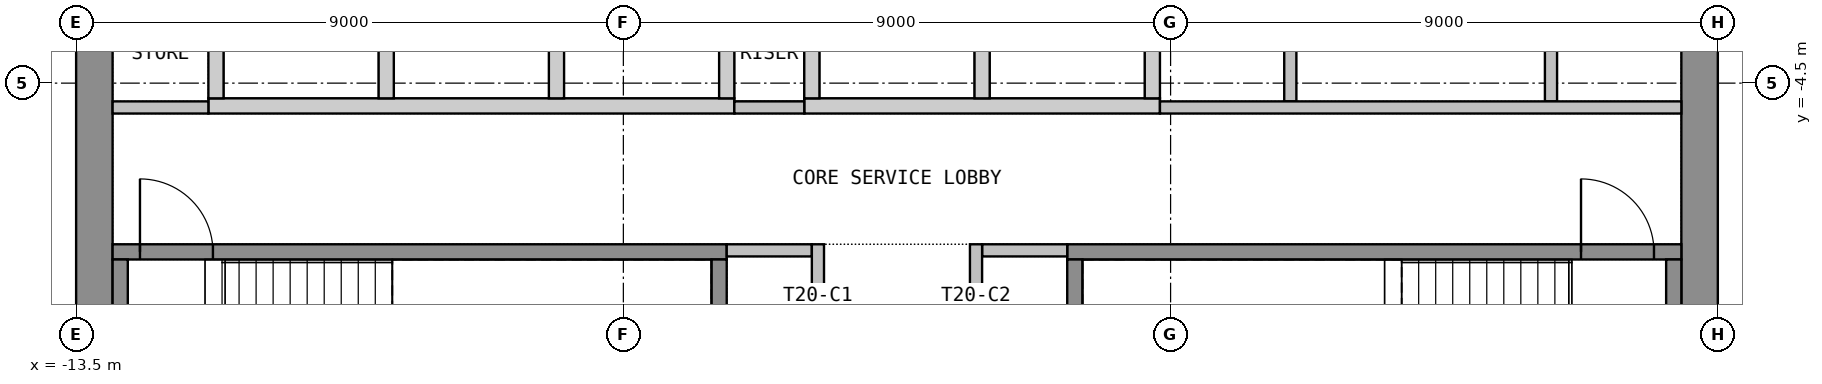
"""IFC4 building model, lengths in metres.
Left out: names, types, materials, properties, quantities, classifications, styles, units other than length and angle.
Written with IfcOpenShell. Run it as: python <this file> out.ifc"""

import sys

from ifc_helpers import new_model, si_unit, direction, frame, frame_2d, origin, place, context, subcontext, project, spatial, polyline, rectangle, outline, extrude, element, fill, save


model = new_model("IFC4")
c1 = context("Model", 3, precision=1e-05, world=origin(), true_north=direction((0.0, 1.0)))
c2 = subcontext(c1, "Body", "Model", "MODEL_VIEW")
j1 = project(units=[si_unit("LENGTHUNIT", "METRE"), si_unit("PLANEANGLEUNIT", "RADIAN")], contexts=[c1])
p1 = place(None, origin())
s1 = spatial("IfcSite", under=j1, at=p1, CompositionType="ELEMENT")
p2 = place(p1, origin())
s2 = spatial("IfcBuilding", under=s1, at=p2, CompositionType="ELEMENT")
p3 = place(p2, frame((0.0, 0.0, 270.3)))
s3 = spatial("IfcBuildingStorey", under=s2, at=p3, CompositionType="ELEMENT", Elevation=270.3)
p4 = place(p3, frame((-13.2, -10.65, 0.0), z_axis=(0.0, 0.0, 1.0), x_axis=(0.0, 1.0, 0.0)))
e1 = element("IfcWall", 1, at=p4, inside=s3, PredefinedType="SHEAR", context=c2, shape_type="SweptSolid", body=[
    extrude(rectangle(XDim=21.3, YDim=0.6, at=frame_2d((10.65, 0.0))), origin(), (0.0, 0.0, 1.0), 3.575),
])
p5 = place(p4, frame((9.45, 0.0, 0.0)))
e2 = element("IfcOpeningElement", 2, at=p5, cuts=e1, PredefinedType="OPENING", context=c2, shape_type="SweptSolid", body=[
    extrude(rectangle(XDim=2.4, YDim=2.1, at=frame_2d((1.2, 1.05))), frame((0.0, 0.31, 0.0), z_axis=(0.0, -1.0, 0.0), x_axis=(1.0, 0.0, 0.0)), (0.0, 0.0, 1.0), 0.62),
])
p6 = place(p3, frame((13.2, -10.65, 0.0), z_axis=(0.0, 0.0, 1.0), x_axis=(0.0, 1.0, 0.0)))
e3 = element("IfcWall", 3, at=p6, inside=s3, PredefinedType="SHEAR", context=c2, shape_type="SweptSolid", body=[
    extrude(rectangle(XDim=21.3, YDim=0.6, at=frame_2d((10.65, 0.0))), origin(), (0.0, 0.0, 1.0), 3.575),
])
p7 = place(p6, frame((9.45, 0.0, 0.0)))
e4 = element("IfcOpeningElement", 4, at=p7, cuts=e3, PredefinedType="OPENING", context=c2, shape_type="SweptSolid", body=[
    extrude(rectangle(XDim=2.4, YDim=2.1, at=frame_2d((1.2, 1.05))), frame((0.0, 0.31, 0.0), z_axis=(0.0, -1.0, 0.0), x_axis=(1.0, 0.0, 0.0)), (0.0, 0.0, 1.0), 0.62),
])
p8 = place(p3, origin())
e5 = element("IfcWall", 5, at=p8, inside=s3, PredefinedType="SHEAR", context=c2, shape_type="SweptSolid", body=[
    extrude(outline(polyline([(-11.325, -5.0), (-2.675, -5.0), (-2.675, -4.75), (-11.325, -4.75), (-11.325, -5.0)])), origin(), (0.0, 0.0, 1.0), 3.575),
])
p9 = place(p3, origin())
e6 = element("IfcWall", 6, at=p9, inside=s3, PredefinedType="SHEAR", context=c2, shape_type="SweptSolid", body=[
    extrude(outline(polyline([(-1.525, -5.0), (4.325, -5.0), (4.325, -4.75), (-1.525, -4.75), (-1.525, -5.0)])), origin(), (0.0, 0.0, 1.0), 3.575),
])
p10 = place(p3, origin())
e7 = element("IfcWall", 7, at=p10, inside=s3, PredefinedType="SHEAR", context=c2, shape_type="SweptSolid", body=[
    extrude(outline(polyline([(-11.325, -4.75), (-11.075, -4.75), (-11.075, -2.05), (-11.325, -2.05), (-11.325, -4.75)])), origin(), (0.0, 0.0, 1.0), 3.575),
])
p11 = place(p3, origin())
e8 = element("IfcWall", 8, at=p11, inside=s3, PredefinedType="SHEAR", context=c2, shape_type="SweptSolid", body=[
    extrude(outline(polyline([(-8.525, -4.75), (-8.275, -4.75), (-8.275, -2.05), (-8.525, -2.05), (-8.525, -4.75)])), origin(), (0.0, 0.0, 1.0), 3.575),
])
p12 = place(p3, origin())
e9 = element("IfcWall", 9, at=p12, inside=s3, PredefinedType="SHEAR", context=c2, shape_type="SweptSolid", body=[
    extrude(outline(polyline([(-5.725, -4.75), (-5.475, -4.75), (-5.475, -2.05), (-5.725, -2.05), (-5.725, -4.75)])), origin(), (0.0, 0.0, 1.0), 3.575),
])
p13 = place(p3, origin())
e10 = element("IfcWall", 10, at=p13, inside=s3, PredefinedType="SHEAR", context=c2, shape_type="SweptSolid", body=[
    extrude(outline(polyline([(-2.925, -4.75), (-2.675, -4.75), (-2.675, -2.05), (-2.925, -2.05), (-2.925, -4.75)])), origin(), (0.0, 0.0, 1.0), 3.575),
])
p14 = place(p3, origin())
e11 = element("IfcWall", 11, at=p14, inside=s3, PredefinedType="SHEAR", context=c2, shape_type="SweptSolid", body=[
    extrude(outline(polyline([(-1.525, -4.75), (-1.275, -4.75), (-1.275, -2.05), (-1.525, -2.05), (-1.525, -4.75)])), origin(), (0.0, 0.0, 1.0), 3.575),
])
p15 = place(p3, origin())
e12 = element("IfcWall", 12, at=p15, inside=s3, PredefinedType="SHEAR", context=c2, shape_type="SweptSolid", body=[
    extrude(outline(polyline([(1.275, -4.75), (1.525, -4.75), (1.525, -2.05), (1.275, -2.05), (1.275, -4.75)])), origin(), (0.0, 0.0, 1.0), 3.575),
])
p16 = place(p3, origin())
e13 = element("IfcWall", 13, at=p16, inside=s3, PredefinedType="SHEAR", context=c2, shape_type="SweptSolid", body=[
    extrude(outline(polyline([(4.075, -4.75), (4.325, -4.75), (4.325, -2.05), (4.075, -2.05), (4.075, -4.75)])), origin(), (0.0, 0.0, 1.0), 3.575),
])
p17 = place(p3, frame((-12.9, -7.275, 0.0), z_axis=(0.0, 0.0, 1.0), x_axis=(1.0, 0.0, 0.0)))
e14 = element("IfcWall", 14, at=p17, inside=s3, PredefinedType="SHEAR", context=c2, shape_type="SweptSolid", body=[
    extrude(rectangle(XDim=10.1, YDim=0.25, at=frame_2d((5.05, 0.0))), origin(), (0.0, 0.0, 1.0), 3.575),
])
p18 = place(p17, frame((0.45, 0.0, 0.0)))
e15 = element("IfcOpeningElement", 15, at=p18, cuts=e14, PredefinedType="OPENING", context=c2, shape_type="SweptSolid", body=[
    extrude(rectangle(XDim=1.2, YDim=2.1, at=frame_2d((0.6, 1.05))), frame((0.0, 0.135, 0.0), z_axis=(0.0, -1.0, 0.0), x_axis=(1.0, 0.0, 0.0)), (0.0, 0.0, 1.0), 0.27),
])
for number, where, z_axis, x_axis in (
    (16, (-12.775, -10.65, 0.0), (0.0, 0.0, 1.0), (0.0, 1.0, 0.0)),
    (17, (-2.925, -10.65, 0.0), (0.0, 0.0, 1.0), (0.0, 1.0, 0.0)),
):
    element("IfcWall", number, at=place(p3, frame(where, z_axis=z_axis, x_axis=x_axis)), inside=s3, PredefinedType="SHEAR", context=c2, shape_type="SweptSolid", body=[
        extrude(rectangle(XDim=3.25, YDim=0.25, at=frame_2d((1.625, 0.0))), origin(), (0.0, 0.0, 1.0), 3.575),
    ])
p19 = place(p3, frame((2.8, -7.275, 0.0), z_axis=(0.0, 0.0, 1.0), x_axis=(1.0, 0.0, 0.0)))
e18 = element("IfcWall", 18, at=p19, inside=s3, PredefinedType="SHEAR", context=c2, shape_type="SweptSolid", body=[
    extrude(rectangle(XDim=10.1, YDim=0.25, at=frame_2d((5.05, 0.0))), origin(), (0.0, 0.0, 1.0), 3.575),
])
p20 = place(p19, frame((8.45, 0.0, 0.0)))
e19 = element("IfcOpeningElement", 19, at=p20, cuts=e18, PredefinedType="OPENING", context=c2, shape_type="SweptSolid", body=[
    extrude(rectangle(XDim=1.2, YDim=2.1, at=frame_2d((0.6, 1.05))), frame((0.0, 0.135, 0.0), z_axis=(0.0, -1.0, 0.0), x_axis=(1.0, 0.0, 0.0)), (0.0, 0.0, 1.0), 0.27),
])
for number, where, z_axis, x_axis in (
    (20, (2.925, -10.65, 0.0), (0.0, 0.0, 1.0), (0.0, 1.0, 0.0)),
    (21, (12.775, -10.65, 0.0), (0.0, 0.0, 1.0), (0.0, 1.0, 0.0)),
):
    element("IfcWall", number, at=place(p3, frame(where, z_axis=z_axis, x_axis=x_axis)), inside=s3, PredefinedType="SHEAR", context=c2, shape_type="SweptSolid", body=[
        extrude(rectangle(XDim=3.25, YDim=0.25, at=frame_2d((1.625, 0.0))), origin(), (0.0, 0.0, 1.0), 3.575),
    ])
for number, where, z_axis, x_axis in (
    (22, (-2.8, -7.25, 0.0), (0.0, 0.0, 1.0), (1.0, 0.0, 0.0)),
    (23, (1.4, -7.25, 0.0), (0.0, 0.0, 1.0), (1.0, 0.0, 0.0)),
):
    element("IfcWall", number, at=place(p3, frame(where, z_axis=z_axis, x_axis=x_axis)), inside=s3, PredefinedType="PARTITIONING", context=c2, shape_type="SweptSolid", body=[
        extrude(rectangle(XDim=1.4, YDim=0.2, at=frame_2d((0.7, 0.0))), origin(), (0.0, 0.0, 1.0), 3.575),
    ])
p21 = place(p3, frame((-1.3, -10.65, 0.0), z_axis=(0.0, 0.0, 1.0), x_axis=(0.0, 1.0, 0.0)))
e24 = element("IfcWall", 24, at=p21, inside=s3, PredefinedType="PARTITIONING", context=c2, shape_type="SweptSolid", body=[
    extrude(rectangle(XDim=3.5, YDim=0.2, at=frame_2d((1.75, 0.0))), origin(), (0.0, 0.0, 1.0), 3.575),
])
p22 = place(p21, frame((1.2, 0.0, 0.0)))
e25 = element("IfcOpeningElement", 25, at=p22, cuts=e24, PredefinedType="OPENING", context=c2, shape_type="SweptSolid", body=[
    extrude(rectangle(XDim=0.9, YDim=2.1, at=frame_2d((0.45, 1.05))), frame((0.0, 0.11, 0.0), z_axis=(0.0, -1.0, 0.0), x_axis=(1.0, 0.0, 0.0)), (0.0, 0.0, 1.0), 0.22),
])
p23 = place(p3, frame((1.3, -10.65, 0.0), z_axis=(0.0, 0.0, 1.0), x_axis=(0.0, 1.0, 0.0)))
e26 = element("IfcWall", 26, at=p23, inside=s3, PredefinedType="PARTITIONING", context=c2, shape_type="SweptSolid", body=[
    extrude(rectangle(XDim=3.5, YDim=0.2, at=frame_2d((1.75, 0.0))), origin(), (0.0, 0.0, 1.0), 3.575),
])
p24 = place(p23, frame((1.2, 0.0, 0.0)))
e27 = element("IfcOpeningElement", 27, at=p24, cuts=e26, PredefinedType="OPENING", context=c2, shape_type="SweptSolid", body=[
    extrude(rectangle(XDim=0.9, YDim=2.1, at=frame_2d((0.45, 1.05))), frame((0.0, 0.11, 0.0), z_axis=(0.0, -1.0, 0.0), x_axis=(1.0, 0.0, 0.0)), (0.0, 0.0, 1.0), 0.22),
])
p25 = place(p3, frame((-12.9, -4.9, 0.0), z_axis=(0.0, 0.0, 1.0), x_axis=(1.0, 0.0, 0.0)))
e28 = element("IfcWall", 28, at=p25, inside=s3, PredefinedType="PARTITIONING", context=c2, shape_type="SweptSolid", body=[
    extrude(rectangle(XDim=1.575, YDim=0.2, at=frame_2d((0.788, 0.0))), origin(), (0.0, 0.0, 1.0), 3.575),
])
p26 = place(p3, frame((-2.675, -4.9, 0.0), z_axis=(0.0, 0.0, 1.0), x_axis=(1.0, 0.0, 0.0)))
e29 = element("IfcWall", 29, at=p26, inside=s3, PredefinedType="PARTITIONING", context=c2, shape_type="SweptSolid", body=[
    extrude(rectangle(XDim=1.15, YDim=0.2, at=frame_2d((0.575, 0.0))), origin(), (0.0, 0.0, 1.0), 3.575),
])
for number, where, z_axis, x_axis in (
    (30, (6.469, -4.8, 0.0), (0.0, 0.0, 1.0), (0.0, 1.0, 0.0)),
    (31, (10.756, -4.8, 0.0), (0.0, 0.0, 1.0), (0.0, 1.0, 0.0)),
):
    element("IfcWall", number, at=place(p3, frame(where, z_axis=z_axis, x_axis=x_axis)), inside=s3, PredefinedType="PARTITIONING", context=c2, shape_type="SweptSolid", body=[
        extrude(rectangle(XDim=2.8, YDim=0.2, at=frame_2d((1.4, 0.0))), origin(), (0.0, 0.0, 1.0), 3.575),
    ])
p27 = place(p3, frame((4.325, -4.9, 0.0), z_axis=(0.0, 0.0, 1.0), x_axis=(1.0, 0.0, 0.0)))
e32 = element("IfcWall", 32, at=p27, inside=s3, PredefinedType="PARTITIONING", context=c2, shape_type="SweptSolid", body=[
    extrude(rectangle(XDim=8.575, YDim=0.2, at=frame_2d((4.288, 0.0))), origin(), (0.0, 0.0, 1.0), 3.575),
])
p28 = place(p18, origin())
e33 = element("IfcDoor", 33, at=p28, inside=s3, OperationType="SINGLE_SWING_LEFT", PredefinedType="DOOR", context=c2, shape_type="SweptSolid", body=[
    extrude(rectangle(XDim=1.2, YDim=2.1, at=frame_2d((0.6, 1.05))), frame((0.0, 0.025, 0.0), z_axis=(0.0, -1.0, 0.0), x_axis=(1.0, 0.0, 0.0)), (0.0, 0.0, 1.0), 0.05),
])
fill(e15, e33)
p29 = place(p20, origin())
e34 = element("IfcDoor", 34, at=p29, inside=s3, OperationType="SINGLE_SWING_LEFT", PredefinedType="DOOR", context=c2, shape_type="SweptSolid", body=[
    extrude(rectangle(XDim=1.2, YDim=2.1, at=frame_2d((0.6, 1.05))), frame((0.0, 0.025, 0.0), z_axis=(0.0, -1.0, 0.0), x_axis=(1.0, 0.0, 0.0)), (0.0, 0.0, 1.0), 0.05),
])
fill(e19, e34)
save(model, sys.argv[1])
